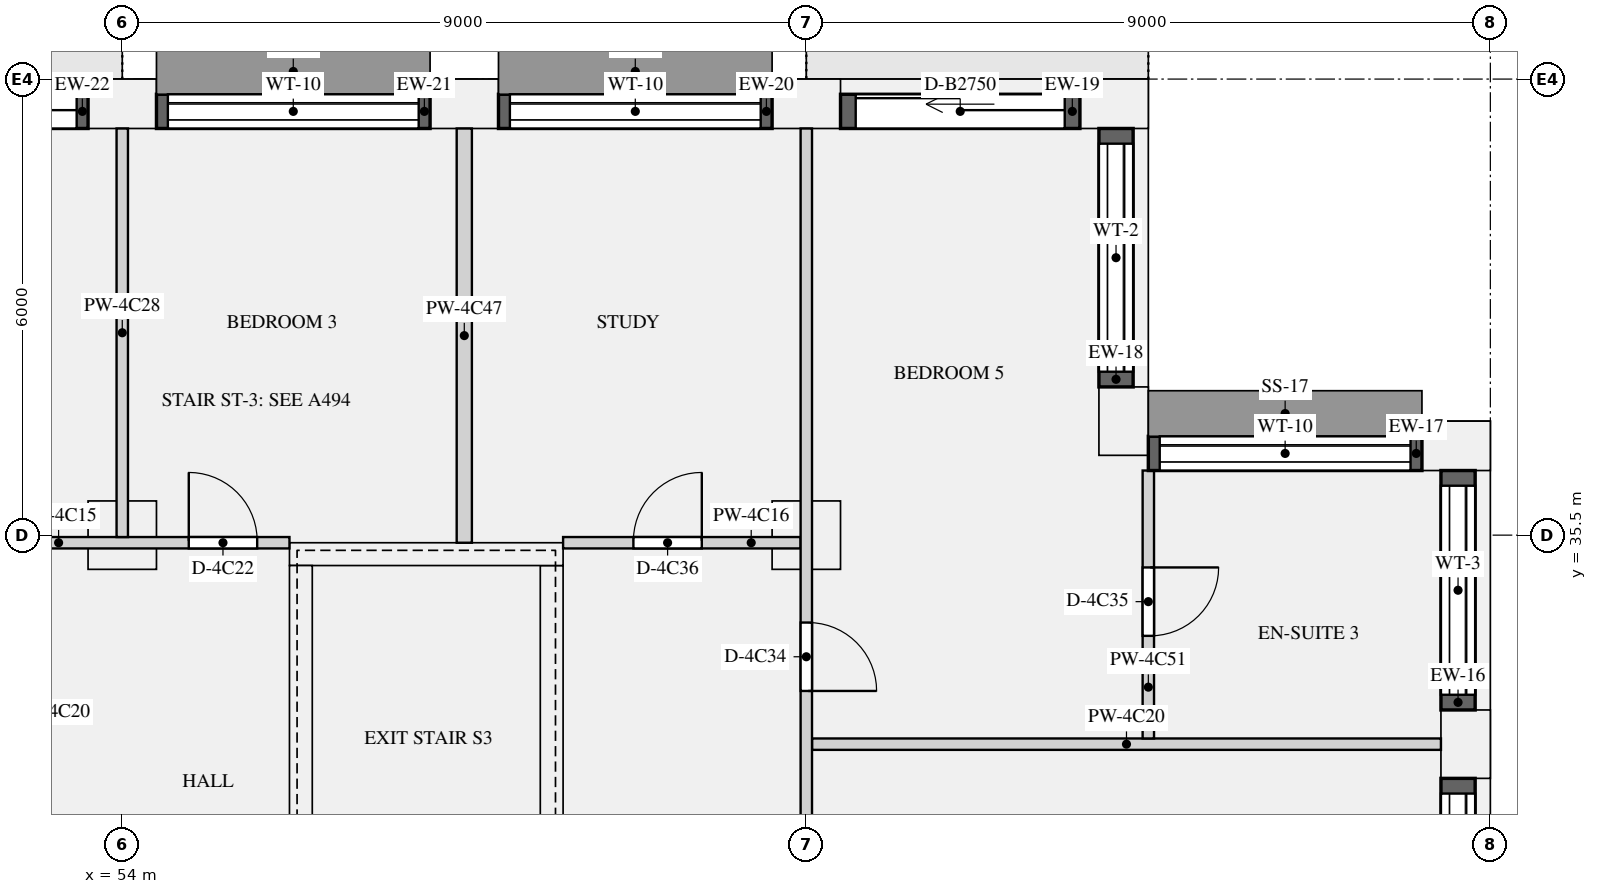
"""IFC4 building model, lengths in metres.
Left out: names, types, materials, properties, quantities, classifications, styles, units other than length and angle.
Written with IfcOpenShell. Run it as: python <this file> out.ifc"""

import sys

from ifc_helpers import new_model, si_unit, direction, frame, frame_2d, origin, origin_2d, place, context, subcontext, project, spatial, rectangle, extrude, element, fill, save


model = new_model("IFC4")
c1 = context("Model", 3, precision=1e-05, world=origin(), true_north=direction((0.0, 1.0)))
c2 = subcontext(c1, "Body", "Model", "MODEL_VIEW")
j1 = project(units=[si_unit("LENGTHUNIT", "METRE"), si_unit("PLANEANGLEUNIT", "RADIAN")], contexts=[c1])
p1 = place(None, origin())
s1 = spatial("IfcSite", under=j1, at=p1, CompositionType="ELEMENT")
p2 = place(p1, origin())
s2 = spatial("IfcBuilding", under=s1, at=p2, CompositionType="ELEMENT")
p3 = place(p2, frame((0.0, 0.0, 216.9)))
s3 = spatial("IfcBuildingStorey", under=s2, at=p3, CompositionType="ELEMENT", Elevation=216.9)
for number, where, z_axis, x_axis in (
    (1, (71.675, 32.75, 0.0), (0.0, 0.0, 1.0), (0.0, 1.0, 0.0)),
    (2, (71.55, 36.675, 0.0), (0.0, 0.0, 1.0), (-1.0, 0.0, 0.0)),
    (3, (67.175, 37.0, 0.0), (0.0, 0.0, 1.0), (0.0, 1.0, 0.0)),
    (4, (67.05, 41.175, 0.0), (0.0, 0.0, 1.0), (-1.0, 0.0, 0.0)),
    (5, (63.0, 41.175, 0.0), (0.0, 0.0, 1.0), (-1.0, 0.0, 0.0)),
    (6, (58.5, 41.175, 0.0), (0.0, 0.0, 1.0), (-1.0, 0.0, 0.0)),
    (7, (54.0, 41.175, 0.0), (0.0, 0.0, 1.0), (-1.0, 0.0, 0.0)),
):
    element("IfcColumn", number, at=place(p3, frame(where, z_axis=z_axis, x_axis=x_axis)), inside=s3, PredefinedType="USERDEFINED", context=c2, shape_type="SweptSolid", body=[
        extrude(rectangle(XDim=0.9, YDim=0.65, at=origin_2d()), origin(), (0.0, 0.0, 1.0), 3.15),
    ])
for number, where, z_axis, x_axis in (
    (8, (54.0, 35.5, 0.0), (0.0, 0.0, 1.0), (1.0, 0.0, 0.0)),
    (9, (63.0, 35.5, 0.0), (0.0, 0.0, 1.0), (1.0, 0.0, 0.0)),
):
    element("IfcColumn", number, at=place(p3, frame(where, z_axis=z_axis, x_axis=x_axis)), inside=s3, PredefinedType="COLUMN", context=c2, shape_type="SweptSolid", body=[
        extrude(rectangle(XDim=0.9, YDim=0.9, at=origin_2d()), origin(), (0.0, 0.0, 1.0), 3.15),
    ])
p4 = place(p3, frame((56.2, 35.25, 0.0), z_axis=(0.0, 0.0, 1.0), x_axis=(1.0, 0.0, 0.0)))
e10 = element("IfcWall", 10, at=p4, inside=s3, PredefinedType="SHEAR", context=c2, shape_type="SweptSolid", body=[
    extrude(rectangle(XDim=3.6, YDim=0.3, at=frame_2d((1.8, 0.0))), origin(), (0.0, 0.0, 1.0), 3.15),
])
for number, where, z_axis, x_axis in (
    (11, (56.35, 27.3, 0.0), (0.0, 0.0, 1.0), (0.0, 1.0, 0.0)),
    (12, (59.65, 27.3, 0.0), (0.0, 0.0, 1.0), (0.0, 1.0, 0.0)),
):
    element("IfcWall", number, at=place(p3, frame(where, z_axis=z_axis, x_axis=x_axis)), inside=s3, PredefinedType="SHEAR", context=c2, shape_type="SweptSolid", body=[
        extrude(rectangle(XDim=7.8, YDim=0.3, at=frame_2d((3.9, 0.0))), origin(), (0.0, 0.0, 1.0), 3.15),
    ])
p5 = place(p3, frame((71.575, 29.4, 0.9), z_axis=(0.0, 0.0, 1.0), x_axis=(0.0, 1.0, 0.0)))
e13 = element("IfcWall", 13, at=p5, inside=s3, PredefinedType="SOLIDWALL", context=c2, shape_type="SweptSolid", body=[
    extrude(rectangle(XDim=2.9, YDim=0.45, at=frame_2d((1.45, 0.0))), origin(), (0.0, 0.0, 1.0), 1.93),
])
p6 = place(p5, frame((0.2, 0.0, 0.15)))
e14 = element("IfcOpeningElement", 14, at=p6, cuts=e13, PredefinedType="OPENING", context=c2, shape_type="SweptSolid", body=[
    extrude(rectangle(XDim=2.5, YDim=1.5, at=frame_2d((1.25, 0.75))), frame((0.0, 0.235, 0.0), z_axis=(0.0, -1.0, 0.0), x_axis=(1.0, 0.0, 0.0)), (0.0, 0.0, 1.0), 0.47),
])
p7 = place(p3, frame((71.575, 33.2, 0.9), z_axis=(0.0, 0.0, 1.0), x_axis=(0.0, 1.0, 0.0)))
e15 = element("IfcWall", 15, at=p7, inside=s3, PredefinedType="SOLIDWALL", context=c2, shape_type="SweptSolid", body=[
    extrude(rectangle(XDim=3.15, YDim=0.45, at=frame_2d((1.575, 0.0))), origin(), (0.0, 0.0, 1.0), 1.93),
])
p8 = place(p7, frame((0.2, 0.0, 0.15)))
e16 = element("IfcOpeningElement", 16, at=p8, cuts=e15, PredefinedType="OPENING", context=c2, shape_type="SweptSolid", body=[
    extrude(rectangle(XDim=2.75, YDim=1.5, at=frame_2d((1.375, 0.75))), frame((0.0, 0.235, 0.0), z_axis=(0.0, -1.0, 0.0), x_axis=(1.0, 0.0, 0.0)), (0.0, 0.0, 1.0), 0.47),
])
p9 = place(p3, frame((71.1, 36.575, 0.9), z_axis=(0.0, 0.0, 1.0), x_axis=(-1.0, 0.0, 0.0)))
e17 = element("IfcWall", 17, at=p9, inside=s3, PredefinedType="SOLIDWALL", context=c2, shape_type="SweptSolid", body=[
    extrude(rectangle(XDim=3.6, YDim=0.45, at=frame_2d((1.8, 0.0))), origin(), (0.0, 0.0, 1.0), 1.93),
])
p10 = place(p9, frame((0.15, 0.0, 0.15)))
e18 = element("IfcOpeningElement", 18, at=p10, cuts=e17, PredefinedType="OPENING", context=c2, shape_type="SweptSolid", body=[
    extrude(rectangle(XDim=3.3, YDim=1.5, at=frame_2d((1.65, 0.75))), frame((0.0, 0.235, 0.0), z_axis=(0.0, -1.0, 0.0), x_axis=(1.0, 0.0, 0.0)), (0.0, 0.0, 1.0), 0.47),
])
p11 = place(p3, frame((67.075, 37.45, 0.9), z_axis=(0.0, 0.0, 1.0), x_axis=(0.0, 1.0, 0.0)))
e19 = element("IfcWall", 19, at=p11, inside=s3, PredefinedType="SOLIDWALL", context=c2, shape_type="SweptSolid", body=[
    extrude(rectangle(XDim=3.4, YDim=0.45, at=frame_2d((1.7, 0.0))), origin(), (0.0, 0.0, 1.0), 1.93),
])
p12 = place(p11, frame((0.2, 0.0, 0.15)))
e20 = element("IfcOpeningElement", 20, at=p12, cuts=e19, PredefinedType="OPENING", context=c2, shape_type="SweptSolid", body=[
    extrude(rectangle(XDim=3.0, YDim=1.5, at=frame_2d((1.5, 0.75))), frame((0.0, 0.235, 0.0), z_axis=(0.0, -1.0, 0.0), x_axis=(1.0, 0.0, 0.0)), (0.0, 0.0, 1.0), 0.47),
])
p13 = place(p3, frame((66.6, 41.075, 0.0), z_axis=(0.0, 0.0, 1.0), x_axis=(-1.0, 0.0, 0.0)))
e21 = element("IfcWall", 21, at=p13, inside=s3, PredefinedType="SOLIDWALL", context=c2, shape_type="SweptSolid", body=[
    extrude(rectangle(XDim=3.15, YDim=0.45, at=frame_2d((1.575, 0.0))), origin(), (0.0, 0.0, 1.0), 2.83),
])
p14 = place(p13, frame((0.2, 0.0, 0.0)))
e22 = element("IfcOpeningElement", 22, at=p14, cuts=e21, PredefinedType="OPENING", context=c2, shape_type="SweptSolid", body=[
    extrude(rectangle(XDim=2.75, YDim=2.3, at=frame_2d((1.375, 1.15))), frame((0.0, 0.235, 0.0), z_axis=(0.0, -1.0, 0.0), x_axis=(1.0, 0.0, 0.0)), (0.0, 0.0, 1.0), 0.47),
])
p15 = place(p3, frame((62.55, 41.075, 0.9), z_axis=(0.0, 0.0, 1.0), x_axis=(-1.0, 0.0, 0.0)))
e23 = element("IfcWall", 23, at=p15, inside=s3, PredefinedType="SOLIDWALL", context=c2, shape_type="SweptSolid", body=[
    extrude(rectangle(XDim=3.6, YDim=0.45, at=frame_2d((1.8, 0.0))), origin(), (0.0, 0.0, 1.0), 1.93),
])
p16 = place(p15, frame((0.15, 0.0, 0.15)))
e24 = element("IfcOpeningElement", 24, at=p16, cuts=e23, PredefinedType="OPENING", context=c2, shape_type="SweptSolid", body=[
    extrude(rectangle(XDim=3.3, YDim=1.5, at=frame_2d((1.65, 0.75))), frame((0.0, 0.235, 0.0), z_axis=(0.0, -1.0, 0.0), x_axis=(1.0, 0.0, 0.0)), (0.0, 0.0, 1.0), 0.47),
])
p17 = place(p3, frame((58.05, 41.075, 0.9), z_axis=(0.0, 0.0, 1.0), x_axis=(-1.0, 0.0, 0.0)))
e25 = element("IfcWall", 25, at=p17, inside=s3, PredefinedType="SOLIDWALL", context=c2, shape_type="SweptSolid", body=[
    extrude(rectangle(XDim=3.6, YDim=0.45, at=frame_2d((1.8, 0.0))), origin(), (0.0, 0.0, 1.0), 1.93),
])
p18 = place(p17, frame((0.15, 0.0, 0.15)))
e26 = element("IfcOpeningElement", 26, at=p18, cuts=e25, PredefinedType="OPENING", context=c2, shape_type="SweptSolid", body=[
    extrude(rectangle(XDim=3.3, YDim=1.5, at=frame_2d((1.65, 0.75))), frame((0.0, 0.235, 0.0), z_axis=(0.0, -1.0, 0.0), x_axis=(1.0, 0.0, 0.0)), (0.0, 0.0, 1.0), 0.47),
])
p19 = place(p3, frame((53.55, 41.075, 0.0), z_axis=(0.0, 0.0, 1.0), x_axis=(-1.0, 0.0, 0.0)))
e27 = element("IfcWall", 27, at=p19, inside=s3, PredefinedType="SOLIDWALL", context=c2, shape_type="SweptSolid", body=[
    extrude(rectangle(XDim=3.6, YDim=0.45, at=frame_2d((1.8, 0.0))), origin(), (0.0, 0.0, 1.0), 2.83),
])
p20 = place(p19, frame((0.15, 0.0, 0.0)))
e28 = element("IfcOpeningElement", 28, at=p20, cuts=e27, PredefinedType="OPENING", context=c2, shape_type="SweptSolid", body=[
    extrude(rectangle(XDim=3.3, YDim=2.3, at=frame_2d((1.65, 1.15))), frame((0.0, 0.235, 0.0), z_axis=(0.0, -1.0, 0.0), x_axis=(1.0, 0.0, 0.0)), (0.0, 0.0, 1.0), 0.47),
])
p21 = place(p3, frame((47.925, 35.4, 0.0), z_axis=(0.0, 0.0, 1.0), x_axis=(1.0, 0.0, 0.0)))
e29 = element("IfcWall", 29, at=p21, inside=s3, PredefinedType="PARTITIONING", context=c2, shape_type="SweptSolid", body=[
    extrude(rectangle(XDim=8.275, YDim=0.15, at=frame_2d((4.137, 0.0))), origin(), (0.0, 0.0, 1.0), 2.83),
])
p22 = place(p21, frame((2.625, 0.0, 0.0)))
e30 = element("IfcOpeningElement", 30, at=p22, cuts=e29, PredefinedType="OPENING", context=c2, shape_type="SweptSolid", body=[
    extrude(rectangle(XDim=0.9, YDim=2.1, at=frame_2d((0.45, 1.05))), frame((0.0, 0.085, 0.0), z_axis=(0.0, -1.0, 0.0), x_axis=(1.0, 0.0, 0.0)), (0.0, 0.0, 1.0), 0.17),
])
p23 = place(p21, frame((6.95, 0.0, 0.0)))
e31 = element("IfcOpeningElement", 31, at=p23, cuts=e29, PredefinedType="OPENING", context=c2, shape_type="SweptSolid", body=[
    extrude(rectangle(XDim=0.9, YDim=2.1, at=frame_2d((0.45, 1.05))), frame((0.0, 0.085, 0.0), z_axis=(0.0, -1.0, 0.0), x_axis=(1.0, 0.0, 0.0)), (0.0, 0.0, 1.0), 0.17),
])
p24 = place(p3, frame((59.8, 35.4, 0.0), z_axis=(0.0, 0.0, 1.0), x_axis=(1.0, 0.0, 0.0)))
e32 = element("IfcWall", 32, at=p24, inside=s3, PredefinedType="PARTITIONING", context=c2, shape_type="SweptSolid", body=[
    extrude(rectangle(XDim=3.125, YDim=0.15, at=frame_2d((1.562, 0.0))), origin(), (0.0, 0.0, 1.0), 2.83),
])
p25 = place(p24, frame((0.925, 0.0, 0.0)))
e33 = element("IfcOpeningElement", 33, at=p25, cuts=e32, PredefinedType="OPENING", context=c2, shape_type="SweptSolid", body=[
    extrude(rectangle(XDim=0.9, YDim=2.1, at=frame_2d((0.45, 1.05))), frame((0.0, 0.085, 0.0), z_axis=(0.0, -1.0, 0.0), x_axis=(1.0, 0.0, 0.0)), (0.0, 0.0, 1.0), 0.17),
])
p26 = place(p3, frame((63.075, 32.75, 0.0), z_axis=(0.0, 0.0, 1.0), x_axis=(1.0, 0.0, 0.0)))
e34 = element("IfcWall", 34, at=p26, inside=s3, PredefinedType="PARTITIONING", context=c2, shape_type="SweptSolid", body=[
    extrude(rectangle(XDim=8.275, YDim=0.15, at=frame_2d((4.138, 0.0))), origin(), (0.0, 0.0, 1.0), 2.83),
])
p27 = place(p3, frame((54.0, 35.475, 0.0), z_axis=(0.0, 0.0, 1.0), x_axis=(0.0, 1.0, 0.0)))
e35 = element("IfcWall", 35, at=p27, inside=s3, PredefinedType="PARTITIONING", context=c2, shape_type="SweptSolid", body=[
    extrude(rectangle(XDim=5.375, YDim=0.15, at=frame_2d((2.688, 0.0))), origin(), (0.0, 0.0, 1.0), 2.83),
])
p28 = place(p3, frame((58.5, 35.4, 0.0), z_axis=(0.0, 0.0, 1.0), x_axis=(0.0, 1.0, 0.0)))
e36 = element("IfcWall", 36, at=p28, inside=s3, PredefinedType="PARTITIONING", context=c2, shape_type="SweptSolid", body=[
    extrude(rectangle(XDim=5.45, YDim=0.2, at=frame_2d((2.725, 0.0))), origin(), (0.0, 0.0, 1.0), 2.83),
])
p29 = place(p3, frame((63.0, 16.575, 0.0), z_axis=(0.0, 0.0, 1.0), x_axis=(0.0, 1.0, 0.0)))
e37 = element("IfcWall", 37, at=p29, inside=s3, PredefinedType="PARTITIONING", context=c2, shape_type="SweptSolid", body=[
    extrude(rectangle(XDim=24.275, YDim=0.15, at=frame_2d((12.138, 0.0))), origin(), (0.0, 0.0, 1.0), 2.83),
])
p30 = place(p29, frame((2.7, 0.0, 0.0)))
e38 = element("IfcOpeningElement", 38, at=p30, cuts=e37, PredefinedType="OPENING", context=c2, shape_type="SweptSolid", body=[
    extrude(rectangle(XDim=1.5, YDim=2.1, at=frame_2d((0.75, 1.05))), frame((0.0, 0.085, 0.0), z_axis=(0.0, -1.0, 0.0), x_axis=(1.0, 0.0, 0.0)), (0.0, 0.0, 1.0), 0.17),
])
p31 = place(p29, frame((13.6, 0.0, 0.0)))
e39 = element("IfcOpeningElement", 39, at=p31, cuts=e37, PredefinedType="OPENING", context=c2, shape_type="SweptSolid", body=[
    extrude(rectangle(XDim=0.9, YDim=2.1, at=frame_2d((0.45, 1.05))), frame((0.0, 0.085, 0.0), z_axis=(0.0, -1.0, 0.0), x_axis=(1.0, 0.0, 0.0)), (0.0, 0.0, 1.0), 0.17),
])
p32 = place(p29, frame((16.875, 0.0, 0.0)))
e40 = element("IfcOpeningElement", 40, at=p32, cuts=e37, PredefinedType="OPENING", context=c2, shape_type="SweptSolid", body=[
    extrude(rectangle(XDim=0.9, YDim=2.1, at=frame_2d((0.45, 1.05))), frame((0.0, 0.085, 0.0), z_axis=(0.0, -1.0, 0.0), x_axis=(1.0, 0.0, 0.0)), (0.0, 0.0, 1.0), 0.17),
])
p33 = place(p3, frame((67.5, 32.825, 0.0), z_axis=(0.0, 0.0, 1.0), x_axis=(0.0, 1.0, 0.0)))
e41 = element("IfcWall", 41, at=p33, inside=s3, PredefinedType="PARTITIONING", context=c2, shape_type="SweptSolid", body=[
    extrude(rectangle(XDim=3.525, YDim=0.15, at=frame_2d((1.763, 0.0))), origin(), (0.0, 0.0, 1.0), 2.83),
])
p34 = place(p33, frame((1.35, 0.0, 0.0)))
e42 = element("IfcOpeningElement", 42, at=p34, cuts=e41, PredefinedType="OPENING", context=c2, shape_type="SweptSolid", body=[
    extrude(rectangle(XDim=0.9, YDim=2.1, at=frame_2d((0.45, 1.05))), frame((0.0, 0.085, 0.0), z_axis=(0.0, -1.0, 0.0), x_axis=(1.0, 0.0, 0.0)), (0.0, 0.0, 1.0), 0.17),
])
p35 = place(p6, origin())
e43 = element("IfcWindow", 43, at=p35, inside=s3, PartitioningType="SINGLE_PANEL", PredefinedType="WINDOW", context=c2, shape_type="SweptSolid", body=[
    extrude(rectangle(XDim=2.5, YDim=1.5, at=frame_2d((1.25, 0.75))), frame((0.0, -0.065, 0.0), z_axis=(0.0, -1.0, 0.0), x_axis=(1.0, 0.0, 0.0)), (0.0, 0.0, 1.0), 0.06),
])
fill(e14, e43)
p36 = place(p8, origin())
e44 = element("IfcWindow", 44, at=p36, inside=s3, PartitioningType="SINGLE_PANEL", PredefinedType="WINDOW", context=c2, shape_type="SweptSolid", body=[
    extrude(rectangle(XDim=2.75, YDim=1.5, at=frame_2d((1.375, 0.75))), frame((0.0, -0.065, 0.0), z_axis=(0.0, -1.0, 0.0), x_axis=(1.0, 0.0, 0.0)), (0.0, 0.0, 1.0), 0.06),
])
fill(e16, e44)
p37 = place(p10, origin())
e45 = element("IfcWindow", 45, at=p37, inside=s3, PartitioningType="SINGLE_PANEL", PredefinedType="WINDOW", context=c2, shape_type="SweptSolid", body=[
    extrude(rectangle(XDim=3.3, YDim=1.5, at=frame_2d((1.65, 0.75))), frame((0.0, -0.065, 0.0), z_axis=(0.0, -1.0, 0.0), x_axis=(1.0, 0.0, 0.0)), (0.0, 0.0, 1.0), 0.06),
])
fill(e18, e45)
p38 = place(p12, origin())
e46 = element("IfcWindow", 46, at=p38, inside=s3, PartitioningType="SINGLE_PANEL", PredefinedType="WINDOW", context=c2, shape_type="SweptSolid", body=[
    extrude(rectangle(XDim=3.0, YDim=1.5, at=frame_2d((1.5, 0.75))), frame((0.0, -0.065, 0.0), z_axis=(0.0, -1.0, 0.0), x_axis=(1.0, 0.0, 0.0)), (0.0, 0.0, 1.0), 0.06),
])
fill(e20, e46)
p39 = place(p14, origin())
e47 = element("IfcDoor", 47, at=p39, inside=s3, OperationType="SLIDING_TO_LEFT", PredefinedType="DOOR", context=c2, shape_type="SweptSolid", body=[
    extrude(rectangle(XDim=2.75, YDim=2.3, at=frame_2d((1.375, 1.15))), frame((0.0, -0.07, 0.0), z_axis=(0.0, -1.0, 0.0), x_axis=(1.0, 0.0, 0.0)), (0.0, 0.0, 1.0), 0.05),
])
fill(e22, e47)
p40 = place(p16, origin())
e48 = element("IfcWindow", 48, at=p40, inside=s3, PartitioningType="SINGLE_PANEL", PredefinedType="WINDOW", context=c2, shape_type="SweptSolid", body=[
    extrude(rectangle(XDim=3.3, YDim=1.5, at=frame_2d((1.65, 0.75))), frame((0.0, -0.065, 0.0), z_axis=(0.0, -1.0, 0.0), x_axis=(1.0, 0.0, 0.0)), (0.0, 0.0, 1.0), 0.06),
])
fill(e24, e48)
p41 = place(p18, origin())
e49 = element("IfcWindow", 49, at=p41, inside=s3, PartitioningType="SINGLE_PANEL", PredefinedType="WINDOW", context=c2, shape_type="SweptSolid", body=[
    extrude(rectangle(XDim=3.3, YDim=1.5, at=frame_2d((1.65, 0.75))), frame((0.0, -0.065, 0.0), z_axis=(0.0, -1.0, 0.0), x_axis=(1.0, 0.0, 0.0)), (0.0, 0.0, 1.0), 0.06),
])
fill(e26, e49)
p42 = place(p20, origin())
e50 = element("IfcDoor", 50, at=p42, inside=s3, OperationType="SLIDING_TO_LEFT", PredefinedType="DOOR", context=c2, shape_type="SweptSolid", body=[
    extrude(rectangle(XDim=3.3, YDim=2.3, at=frame_2d((1.65, 1.15))), frame((0.0, -0.07, 0.0), z_axis=(0.0, -1.0, 0.0), x_axis=(1.0, 0.0, 0.0)), (0.0, 0.0, 1.0), 0.05),
])
fill(e28, e50)
p43 = place(p23, origin())
e51 = element("IfcDoor", 51, at=p43, inside=s3, OperationType="SINGLE_SWING_LEFT", PredefinedType="DOOR", context=c2, shape_type="SweptSolid", body=[
    extrude(rectangle(XDim=0.9, YDim=2.1, at=frame_2d((0.45, 1.05))), frame((0.0, 0.025, 0.0), z_axis=(0.0, -1.0, 0.0), x_axis=(1.0, 0.0, 0.0)), (0.0, 0.0, 1.0), 0.05),
])
fill(e31, e51)
p44 = place(p32, frame((0.9, 0.0, 0.0), z_axis=(0.0, 0.0, 1.0), x_axis=(-1.0, 0.0, 0.0)))
e52 = element("IfcDoor", 52, at=p44, inside=s3, OperationType="SINGLE_SWING_RIGHT", PredefinedType="DOOR", context=c2, shape_type="SweptSolid", body=[
    extrude(rectangle(XDim=0.9, YDim=2.1, at=frame_2d((0.45, 1.05))), frame((0.0, 0.025, 0.0), z_axis=(0.0, -1.0, 0.0), x_axis=(1.0, 0.0, 0.0)), (0.0, 0.0, 1.0), 0.05),
])
fill(e40, e52)
p45 = place(p34, frame((0.9, 0.0, 0.0), z_axis=(0.0, 0.0, 1.0), x_axis=(-1.0, 0.0, 0.0)))
e53 = element("IfcDoor", 53, at=p45, inside=s3, OperationType="SINGLE_SWING_LEFT", PredefinedType="DOOR", context=c2, shape_type="SweptSolid", body=[
    extrude(rectangle(XDim=0.9, YDim=2.1, at=frame_2d((0.45, 1.05))), frame((0.0, 0.025, 0.0), z_axis=(0.0, -1.0, 0.0), x_axis=(1.0, 0.0, 0.0)), (0.0, 0.0, 1.0), 0.05),
])
fill(e42, e53)
p46 = place(p25, origin())
e54 = element("IfcDoor", 54, at=p46, inside=s3, OperationType="SINGLE_SWING_RIGHT", PredefinedType="DOOR", context=c2, shape_type="SweptSolid", body=[
    extrude(rectangle(XDim=0.9, YDim=2.1, at=frame_2d((0.45, 1.05))), frame((0.0, 0.025, 0.0), z_axis=(0.0, -1.0, 0.0), x_axis=(1.0, 0.0, 0.0)), (0.0, 0.0, 1.0), 0.05),
])
fill(e33, e54)
save(model, sys.argv[1])
